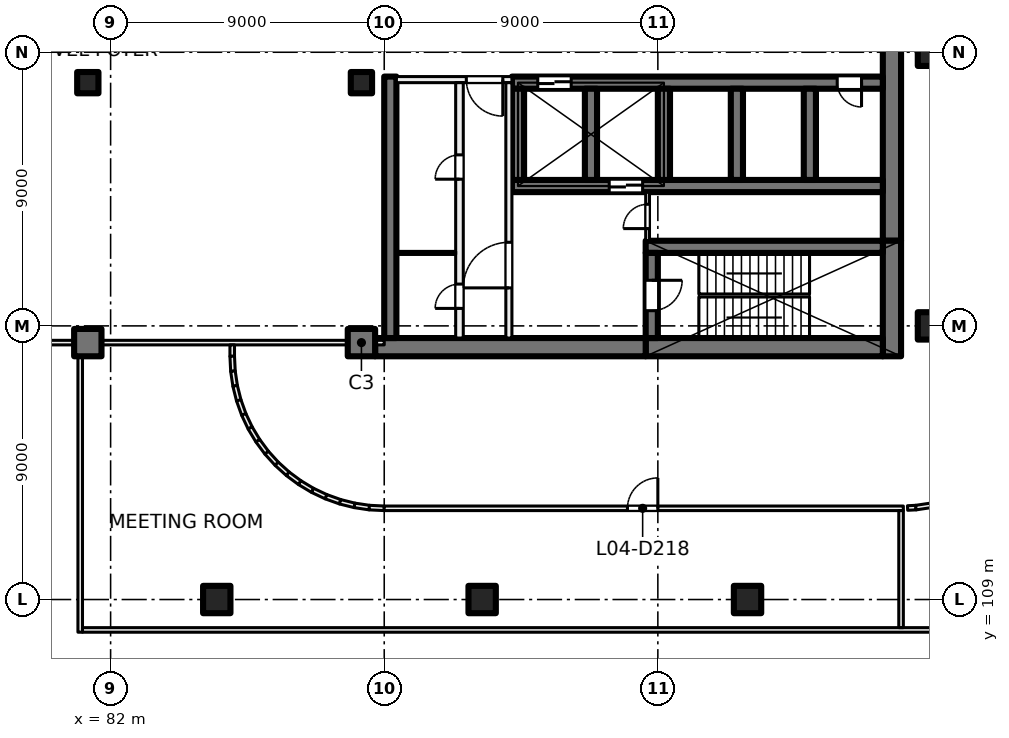
"""IFC4 building model, lengths in metres.
Left out: names, types, materials, properties, quantities, classifications, styles, units other than length and angle.
Written with IfcOpenShell. Run it as: python <this file> out.ifc"""

import sys

from ifc_helpers import new_model, si_unit, direction, frame, frame_2d, origin, origin_2d, place, context, subcontext, project, spatial, rectangle, extrude, element, fill, save


model = new_model("IFC4")
c1 = context("Model", 3, precision=1e-05, world=origin(), true_north=direction((0.0, 1.0)))
c2 = subcontext(c1, "Body", "Model", "MODEL_VIEW")
j1 = project(units=[si_unit("LENGTHUNIT", "METRE"), si_unit("PLANEANGLEUNIT", "RADIAN")], contexts=[c1])
p1 = place(None, origin())
s1 = spatial("IfcSite", under=j1, at=p1, CompositionType="ELEMENT")
p2 = place(p1, origin())
s2 = spatial("IfcBuilding", under=s1, at=p2, CompositionType="ELEMENT")
p3 = place(p2, frame((0.0, 0.0, 22.5)))
s3 = spatial("IfcBuildingStorey", under=s2, at=p3, CompositionType="ELEMENT", Elevation=22.5)
for number, where, z_axis, x_axis in (
    (1, (109.0, 118.0, 0.0), (0.0, 0.0, 1.0), (1.0, 0.0, 0.0)),
    (2, (109.0, 127.0, 0.0), (0.0, 0.0, 1.0), (1.0, 0.0, 0.0)),
    (3, (85.491, 109.0, 0.0), (0.0, 0.0, 1.0), (1.0, 0.0, 0.0)),
    (4, (94.221, 109.0, 0.0), (0.0, 0.0, 1.0), (1.0, 0.0, 0.0)),
    (5, (102.95, 109.0, 0.0), (0.0, 0.0, 1.0), (1.0, 0.0, 0.0)),
):
    element("IfcColumn", number, at=place(p3, frame(where, z_axis=z_axis, x_axis=x_axis)), inside=s3, PredefinedType="COLUMN", context=c2, shape_type="SweptSolid", body=[
        extrude(rectangle(XDim=0.9, YDim=0.9, at=origin_2d()), origin(), (0.0, 0.0, 1.0), 5.0),
    ])
for number, where, z_axis, x_axis in (
    (6, (81.25, 126.0, 0.0), (0.0, 0.0, 1.0), (1.0, 0.0, 0.0)),
    (7, (90.25, 126.0, 0.0), (0.0, 0.0, 1.0), (1.0, 0.0, 0.0)),
):
    element("IfcColumn", number, at=place(p3, frame(where, z_axis=z_axis, x_axis=x_axis)), inside=s3, PredefinedType="COLUMN", context=c2, shape_type="SweptSolid", body=[
        extrude(rectangle(XDim=0.7, YDim=0.7, at=origin_2d()), origin(), (0.0, 0.0, 1.0), 5.0),
    ])
for number, where, z_axis, x_axis in (
    (8, (81.25, 117.45, 0.0), (0.0, 0.0, 1.0), (1.0, 0.0, 0.0)),
    (9, (90.25, 117.45, 0.0), (0.0, 0.0, 1.0), (1.0, 0.0, 0.0)),
):
    element("IfcColumn", number, at=place(p3, frame(where, z_axis=z_axis, x_axis=x_axis)), inside=s3, PredefinedType="COLUMN", context=c2, shape_type="SweptSolid", body=[
        extrude(rectangle(XDim=0.9, YDim=0.9, at=origin_2d()), origin(), (0.0, 0.0, 1.0), 5.0),
    ])
p4 = place(p3, frame((107.7, 135.2, 0.0), z_axis=(0.0, 0.0, 1.0), x_axis=(0.0, -1.0, 0.0)))
e10 = element("IfcWall", 10, at=p4, inside=s3, PredefinedType="SHEAR", context=c2, shape_type="SweptSolid", body=[
    extrude(rectangle(XDim=14.4, YDim=0.6, at=frame_2d((7.2, 0.0))), origin(), (0.0, 0.0, 1.0), 5.0),
])
p5 = place(p3, frame((107.7, 120.8, 0.0), z_axis=(0.0, 0.0, 1.0), x_axis=(0.0, -1.0, 0.0)))
e11 = element("IfcWall", 11, at=p5, inside=s3, PredefinedType="SHEAR", context=c2, shape_type="SweptSolid", body=[
    extrude(rectangle(XDim=3.8, YDim=0.6, at=frame_2d((1.9, 0.0))), origin(), (0.0, 0.0, 1.0), 5.0),
])
p6 = place(p3, frame((107.4, 117.3, 0.0), z_axis=(0.0, 0.0, 1.0), x_axis=(-1.0, 0.0, 0.0)))
e12 = element("IfcWall", 12, at=p6, inside=s3, PredefinedType="SHEAR", context=c2, shape_type="SweptSolid", body=[
    extrude(rectangle(XDim=7.8, YDim=0.6, at=frame_2d((3.9, 0.0))), origin(), (0.0, 0.0, 1.0), 5.0),
])
p7 = place(p3, frame((99.6, 117.3, 0.0), z_axis=(0.0, 0.0, 1.0), x_axis=(-1.0, 0.0, 0.0)))
e13 = element("IfcWall", 13, at=p7, inside=s3, PredefinedType="SHEAR", context=c2, shape_type="SweptSolid", body=[
    extrude(rectangle(XDim=8.9, YDim=0.6, at=frame_2d((4.45, 0.0))), origin(), (0.0, 0.0, 1.0), 5.0),
])
p8 = place(p3, frame((107.4, 120.6, 0.0), z_axis=(0.0, 0.0, 1.0), x_axis=(-1.0, 0.0, 0.0)))
e14 = element("IfcWall", 14, at=p8, inside=s3, PredefinedType="SHEAR", context=c2, shape_type="SweptSolid", body=[
    extrude(rectangle(XDim=7.8, YDim=0.4, at=frame_2d((3.9, 0.0))), origin(), (0.0, 0.0, 1.0), 5.0),
])
p9 = place(p3, frame((99.8, 120.4, 0.0), z_axis=(0.0, 0.0, 1.0), x_axis=(0.0, -1.0, 0.0)))
e15 = element("IfcWall", 15, at=p9, inside=s3, PredefinedType="SHEAR", context=c2, shape_type="SweptSolid", body=[
    extrude(rectangle(XDim=2.8, YDim=0.4, at=frame_2d((1.4, 0.0))), origin(), (0.0, 0.0, 1.0), 5.0),
])
p10 = place(p9, frame((0.9, 0.0, 0.0)))
e16 = element("IfcOpeningElement", 16, at=p10, cuts=e15, PredefinedType="OPENING", context=c2, shape_type="SweptSolid", body=[
    extrude(rectangle(XDim=1.0, YDim=2.1, at=frame_2d((0.5, 1.05))), frame((0.0, 0.21, 0.0), z_axis=(0.0, -1.0, 0.0), x_axis=(1.0, 0.0, 0.0)), (0.0, 0.0, 1.0), 0.42),
])
p11 = place(p3, frame((107.4, 126.0, 0.0), z_axis=(0.0, 0.0, 1.0), x_axis=(-1.0, 0.0, 0.0)))
e17 = element("IfcWall", 17, at=p11, inside=s3, PredefinedType="SHEAR", context=c2, shape_type="SweptSolid", body=[
    extrude(rectangle(XDim=12.2, YDim=0.4, at=frame_2d((6.1, 0.0))), origin(), (0.0, 0.0, 1.0), 5.0),
])
p12 = place(p11, frame((10.25, 0.0, 0.0)))
e18 = element("IfcOpeningElement", 18, at=p12, cuts=e17, PredefinedType="OPENING", context=c2, shape_type="SweptSolid", body=[
    extrude(rectangle(XDim=1.1, YDim=2.1, at=frame_2d((0.55, 1.05))), frame((0.0, 0.21, 0.0), z_axis=(0.0, -1.0, 0.0), x_axis=(1.0, 0.0, 0.0)), (0.0, 0.0, 1.0), 0.42),
])
p13 = place(p11, frame((0.7, 0.0, 0.0)))
e19 = element("IfcOpeningElement", 19, at=p13, cuts=e17, PredefinedType="OPENING", context=c2, shape_type="SweptSolid", body=[
    extrude(rectangle(XDim=0.8, YDim=2.1, at=frame_2d((0.4, 1.05))), frame((0.0, 0.21, 0.0), z_axis=(0.0, -1.0, 0.0), x_axis=(1.0, 0.0, 0.0)), (0.0, 0.0, 1.0), 0.42),
])
p14 = place(p3, frame((107.4, 122.6, 0.0), z_axis=(0.0, 0.0, 1.0), x_axis=(-1.0, 0.0, 0.0)))
e20 = element("IfcWall", 20, at=p14, inside=s3, PredefinedType="SHEAR", context=c2, shape_type="SweptSolid", body=[
    extrude(rectangle(XDim=12.2, YDim=0.4, at=frame_2d((6.1, 0.0))), origin(), (0.0, 0.0, 1.0), 5.0),
])
p15 = place(p14, frame((7.9, 0.0, 0.0)))
e21 = element("IfcOpeningElement", 21, at=p15, cuts=e20, PredefinedType="OPENING", context=c2, shape_type="SweptSolid", body=[
    extrude(rectangle(XDim=1.1, YDim=2.1, at=frame_2d((0.55, 1.05))), frame((0.0, 0.21, 0.0), z_axis=(0.0, -1.0, 0.0), x_axis=(1.0, 0.0, 0.0)), (0.0, 0.0, 1.0), 0.42),
])
for number, where, z_axis, x_axis in (
    (22, (105.0, 125.8, 0.0), (0.0, 0.0, 1.0), (0.0, -1.0, 0.0)),
    (23, (102.6, 125.8, 0.0), (0.0, 0.0, 1.0), (0.0, -1.0, 0.0)),
    (24, (100.2, 125.8, 0.0), (0.0, 0.0, 1.0), (0.0, -1.0, 0.0)),
    (25, (97.8, 125.8, 0.0), (0.0, 0.0, 1.0), (0.0, -1.0, 0.0)),
    (26, (95.4, 125.8, 0.0), (0.0, 0.0, 1.0), (0.0, -1.0, 0.0)),
):
    element("IfcWall", number, at=place(p3, frame(where, z_axis=z_axis, x_axis=x_axis)), inside=s3, PredefinedType="SHEAR", context=c2, shape_type="SweptSolid", body=[
        extrude(rectangle(XDim=3.0, YDim=0.4, at=frame_2d((1.5, 0.0))), origin(), (0.0, 0.0, 1.0), 5.0),
    ])
p16 = place(p3, frame((91.2, 126.2, 0.0), z_axis=(0.0, 0.0, 1.0), x_axis=(0.0, -1.0, 0.0)))
e27 = element("IfcWall", 27, at=p16, inside=s3, PredefinedType="SHEAR", context=c2, shape_type="SweptSolid", body=[
    extrude(rectangle(XDim=8.6, YDim=0.4, at=frame_2d((4.3, 0.0))), origin(), (0.0, 0.0, 1.0), 5.0),
])
p17 = place(p3, frame((95.2, 126.1, 0.0), z_axis=(0.0, 0.0, 1.0), x_axis=(-1.0, 0.0, 0.0)))
e28 = element("IfcWall", 28, at=p17, inside=s3, PredefinedType="PARTITIONING", context=c2, shape_type="SweptSolid", body=[
    extrude(rectangle(XDim=3.8, YDim=0.2, at=frame_2d((1.9, 0.0))), origin(), (0.0, 0.0, 1.0), 4.625),
])
p18 = place(p17, frame((0.3, 0.0, 0.0)))
e29 = element("IfcOpeningElement", 29, at=p18, cuts=e28, PredefinedType="OPENING", context=c2, shape_type="SweptSolid", body=[
    extrude(rectangle(XDim=1.2, YDim=2.1, at=frame_2d((0.6, 1.05))), frame((0.0, 0.11, 0.0), z_axis=(0.0, -1.0, 0.0), x_axis=(1.0, 0.0, 0.0)), (0.0, 0.0, 1.0), 0.22),
])
p19 = place(p3, frame((95.1, 117.6, 0.0), z_axis=(0.0, 0.0, 1.0), x_axis=(0.0, 1.0, 0.0)))
e30 = element("IfcWall", 30, at=p19, inside=s3, PredefinedType="PARTITIONING", context=c2, shape_type="SweptSolid", body=[
    extrude(rectangle(XDim=8.4, YDim=0.2, at=frame_2d((4.2, 0.0))), origin(), (0.0, 0.0, 1.0), 4.625),
])
p20 = place(p19, frame((1.65, 0.0, 0.0)))
e31 = element("IfcOpeningElement", 31, at=p20, cuts=e30, PredefinedType="OPENING", context=c2, shape_type="SweptSolid", body=[
    extrude(rectangle(XDim=1.5, YDim=2.1, at=frame_2d((0.75, 1.05))), frame((0.0, 0.11, 0.0), z_axis=(0.0, -1.0, 0.0), x_axis=(1.0, 0.0, 0.0)), (0.0, 0.0, 1.0), 0.22),
])
p21 = place(p3, frame((93.475, 117.6, 0.0), z_axis=(0.0, 0.0, 1.0), x_axis=(0.0, 1.0, 0.0)))
e32 = element("IfcWall", 32, at=p21, inside=s3, PredefinedType="PARTITIONING", context=c2, shape_type="SweptSolid", body=[
    extrude(rectangle(XDim=8.4, YDim=0.25, at=frame_2d((4.2, 0.0))), origin(), (0.0, 0.0, 1.0), 4.625),
])
p22 = place(p21, frame((5.225, 0.0, 0.0)))
e33 = element("IfcOpeningElement", 33, at=p22, cuts=e32, PredefinedType="OPENING", context=c2, shape_type="SweptSolid", body=[
    extrude(rectangle(XDim=0.8, YDim=2.1, at=frame_2d((0.4, 1.05))), frame((0.0, 0.135, 0.0), z_axis=(0.0, -1.0, 0.0), x_axis=(1.0, 0.0, 0.0)), (0.0, 0.0, 1.0), 0.27),
])
p23 = place(p21, frame((0.975, 0.0, 0.0)))
e34 = element("IfcOpeningElement", 34, at=p23, cuts=e32, PredefinedType="OPENING", context=c2, shape_type="SweptSolid", body=[
    extrude(rectangle(XDim=0.8, YDim=2.1, at=frame_2d((0.4, 1.05))), frame((0.0, 0.135, 0.0), z_axis=(0.0, -1.0, 0.0), x_axis=(1.0, 0.0, 0.0)), (0.0, 0.0, 1.0), 0.27),
])
p24 = place(p3, frame((99.663, 120.8, 0.0), z_axis=(0.0, 0.0, 1.0), x_axis=(0.0, 1.0, 0.0)))
e35 = element("IfcWall", 35, at=p24, inside=s3, PredefinedType="PARTITIONING", context=c2, shape_type="SweptSolid", body=[
    extrude(rectangle(XDim=1.6, YDim=0.125, at=frame_2d((0.8, 0.0))), origin(), (0.0, 0.0, 1.0), 4.625),
])
p25 = place(p24, frame((0.4, 0.0, 0.0)))
e36 = element("IfcOpeningElement", 36, at=p25, cuts=e35, PredefinedType="OPENING", context=c2, shape_type="SweptSolid", body=[
    extrude(rectangle(XDim=0.8, YDim=2.1, at=frame_2d((0.4, 1.05))), frame((0.0, 0.073, 0.0), z_axis=(0.0, -1.0, 0.0), x_axis=(1.0, 0.0, 0.0)), (0.0, 0.0, 1.0), 0.145),
])
p26 = place(p3, frame((93.35, 120.4, 0.0), z_axis=(0.0, 0.0, 1.0), x_axis=(-1.0, 0.0, 0.0)))
e37 = element("IfcWall", 37, at=p26, inside=s3, PredefinedType="PARTITIONING", context=c2, shape_type="SweptSolid", body=[
    extrude(rectangle(XDim=1.95, YDim=0.1, at=frame_2d((0.975, 0.0))), origin(), (0.0, 0.0, 1.0), 4.625),
])
p27 = place(p3, frame((49.825, 117.45, 0.0), z_axis=(0.0, 0.0, 1.0), x_axis=(1.0, 0.0, 0.0)))
e38 = element("IfcWall", 38, at=p27, inside=s3, PredefinedType="PARTITIONING", context=c2, shape_type="SweptSolid", body=[
    extrude(rectangle(XDim=41.175, YDim=0.15, at=frame_2d((20.587, 0.0))), origin(), (0.0, 0.0, 1.0), 4.625),
])
p28 = place(p3, frame((81.0, 107.925, 0.0), z_axis=(0.0, 0.0, 1.0), x_axis=(0.0, 1.0, 0.0)))
e39 = element("IfcWall", 39, at=p28, inside=s3, PredefinedType="PARTITIONING", context=c2, shape_type="SweptSolid", body=[
    extrude(rectangle(XDim=9.45, YDim=0.15, at=frame_2d((4.725, 0.0))), origin(), (0.0, 0.0, 1.0), 4.625),
])
p29 = place(p3, frame((81.075, 108.0, 0.0), z_axis=(0.0, 0.0, 1.0), x_axis=(1.0, 0.0, 0.0)))
e40 = element("IfcWall", 40, at=p29, inside=s3, PredefinedType="PARTITIONING", context=c2, shape_type="SweptSolid", body=[
    extrude(rectangle(XDim=31.545, YDim=0.15, at=frame_2d((15.772, 0.0))), origin(), (0.0, 0.0, 1.0), 4.625),
])
p30 = place(p3, frame((86.0, 116.998, 0.0), z_axis=(0.0, 0.0, 1.0), x_axis=(0.0, 1.0, 0.0)))
e41 = element("IfcWall", 41, at=p30, inside=s3, PredefinedType="PARTITIONING", context=c2, shape_type="SweptSolid", body=[
    extrude(rectangle(XDim=0.377, YDim=0.15, at=frame_2d((0.188, 0.0))), origin(), (0.0, 0.0, 1.0), 4.625),
])
p31 = place(p3, frame((86.0, 117.002, 0.0), z_axis=(0.0, 0.0, 1.0), x_axis=(0.048196018647, -0.998837896651, 0.0)))
e42 = element("IfcWall", 42, at=p31, inside=s3, PredefinedType="PARTITIONING", context=c2, shape_type="SweptSolid", body=[
    extrude(rectangle(XDim=0.496, YDim=0.15, at=frame_2d((0.248, 0.0))), origin(), (0.0, 0.0, 1.0), 4.625),
])
p32 = place(p3, frame((86.023, 116.514, 0.0), z_axis=(0.0, 0.0, 1.0), x_axis=(0.148412307247, -0.988925572052, 0.0)))
e43 = element("IfcWall", 43, at=p32, inside=s3, PredefinedType="PARTITIONING", context=c2, shape_type="SweptSolid", body=[
    extrude(rectangle(XDim=0.499, YDim=0.15, at=frame_2d((0.249, 0.0))), origin(), (0.0, 0.0, 1.0), 4.625),
])
p33 = place(p3, frame((86.095, 116.029, 0.0), z_axis=(0.0, 0.0, 1.0), x_axis=(0.242650732785, -0.970113715952, 0.0)))
e44 = element("IfcWall", 44, at=p33, inside=s3, PredefinedType="PARTITIONING", context=c2, shape_type="SweptSolid", body=[
    extrude(rectangle(XDim=0.499, YDim=0.15, at=frame_2d((0.25, 0.0))), origin(), (0.0, 0.0, 1.0), 4.625),
])
for number, where, z_axis, x_axis in (
    (45, (86.214, 115.553, 0.0), (0.0, 0.0, 1.0), (0.337, -0.941, 0.0)),
    (46, (86.379, 115.09, 0.0), (0.0, 0.0, 1.0), (0.428, -0.904, 0.0)),
):
    element("IfcWall", number, at=place(p3, frame(where, z_axis=z_axis, x_axis=x_axis)), inside=s3, PredefinedType="PARTITIONING", context=c2, shape_type="SweptSolid", body=[
        extrude(rectangle(XDim=0.498, YDim=0.15, at=frame_2d((0.249, 0.0))), origin(), (0.0, 0.0, 1.0), 4.625),
    ])
p34 = place(p3, frame((86.588, 114.646, 0.0), z_axis=(0.0, 0.0, 1.0), x_axis=(0.515791778052, -0.85671397893, 0.0)))
e47 = element("IfcWall", 47, at=p34, inside=s3, PredefinedType="PARTITIONING", context=c2, shape_type="SweptSolid", body=[
    extrude(rectangle(XDim=0.499, YDim=0.15, at=frame_2d((0.249, 0.0))), origin(), (0.0, 0.0, 1.0), 4.625),
])
p35 = place(p3, frame((86.841, 114.225, 0.0), z_axis=(0.0, 0.0, 1.0), x_axis=(0.594570362092, -0.80404358372, 0.0)))
e48 = element("IfcWall", 48, at=p35, inside=s3, PredefinedType="PARTITIONING", context=c2, shape_type="SweptSolid", body=[
    extrude(rectangle(XDim=0.498, YDim=0.15, at=frame_2d((0.249, 0.0))), origin(), (0.0, 0.0, 1.0), 4.625),
])
for number, where, z_axis, x_axis in (
    (49, (87.133, 113.831, 0.0), (0.0, 0.0, 1.0), (0.67, -0.742, 0.0)),
    (50, (87.461, 113.467, 0.0), (0.0, 0.0, 1.0), (0.742, -0.67, 0.0)),
):
    element("IfcWall", number, at=place(p3, frame(where, z_axis=z_axis, x_axis=x_axis)), inside=s3, PredefinedType="PARTITIONING", context=c2, shape_type="SweptSolid", body=[
        extrude(rectangle(XDim=0.499, YDim=0.15, at=frame_2d((0.249, 0.0))), origin(), (0.0, 0.0, 1.0), 4.625),
    ])
p36 = place(p3, frame((87.825, 113.137, 0.0), z_axis=(0.0, 0.0, 1.0), x_axis=(0.80404358372, -0.594570362092, 0.0)))
e51 = element("IfcWall", 51, at=p36, inside=s3, PredefinedType="PARTITIONING", context=c2, shape_type="SweptSolid", body=[
    extrude(rectangle(XDim=0.498, YDim=0.15, at=frame_2d((0.249, 0.0))), origin(), (0.0, 0.0, 1.0), 4.625),
])
p37 = place(p3, frame((88.219, 112.845, 0.0), z_axis=(0.0, 0.0, 1.0), x_axis=(0.85671397893, -0.515791778052, 0.0)))
e52 = element("IfcWall", 52, at=p37, inside=s3, PredefinedType="PARTITIONING", context=c2, shape_type="SweptSolid", body=[
    extrude(rectangle(XDim=0.499, YDim=0.15, at=frame_2d((0.249, 0.0))), origin(), (0.0, 0.0, 1.0), 4.625),
])
for number, where, z_axis, x_axis in (
    (53, (88.64, 112.592, 0.0), (0.0, 0.0, 1.0), (0.904, -0.428, 0.0)),
    (54, (89.084, 112.382, 0.0), (0.0, 0.0, 1.0), (0.941, -0.337, 0.0)),
):
    element("IfcWall", number, at=place(p3, frame(where, z_axis=z_axis, x_axis=x_axis)), inside=s3, PredefinedType="PARTITIONING", context=c2, shape_type="SweptSolid", body=[
        extrude(rectangle(XDim=0.498, YDim=0.15, at=frame_2d((0.249, 0.0))), origin(), (0.0, 0.0, 1.0), 4.625),
    ])
p38 = place(p3, frame((89.545, 112.216, 0.0), z_axis=(0.0, 0.0, 1.0), x_axis=(0.970113715952, -0.242650732785, 0.0)))
e55 = element("IfcWall", 55, at=p38, inside=s3, PredefinedType="PARTITIONING", context=c2, shape_type="SweptSolid", body=[
    extrude(rectangle(XDim=0.499, YDim=0.15, at=frame_2d((0.25, 0.0))), origin(), (0.0, 0.0, 1.0), 4.625),
])
p39 = place(p3, frame((90.021, 112.097, 0.0), z_axis=(0.0, 0.0, 1.0), x_axis=(0.988925572052, -0.148412307247, 0.0)))
e56 = element("IfcWall", 56, at=p39, inside=s3, PredefinedType="PARTITIONING", context=c2, shape_type="SweptSolid", body=[
    extrude(rectangle(XDim=0.499, YDim=0.15, at=frame_2d((0.249, 0.0))), origin(), (0.0, 0.0, 1.0), 4.625),
])
p40 = place(p3, frame((90.506, 112.024, 0.0), z_axis=(0.0, 0.0, 1.0), x_axis=(0.998837896651, -0.048196018647, 0.0)))
e57 = element("IfcWall", 57, at=p40, inside=s3, PredefinedType="PARTITIONING", context=c2, shape_type="SweptSolid", body=[
    extrude(rectangle(XDim=0.496, YDim=0.15, at=frame_2d((0.248, 0.0))), origin(), (0.0, 0.0, 1.0), 4.625),
])
p41 = place(p3, frame((108.075, 112.0, 0.0), z_axis=(0.0, 0.0, 1.0), x_axis=(-1.0, 0.0, 0.0)))
e58 = element("IfcWall", 58, at=p41, inside=s3, PredefinedType="PARTITIONING", context=c2, shape_type="SweptSolid", body=[
    extrude(rectangle(XDim=17.077, YDim=0.15, at=frame_2d((8.539, 0.0))), origin(), (0.0, 0.0, 1.0), 4.625),
])
p42 = place(p41, frame((8.075, 0.0, 0.0)))
e59 = element("IfcOpeningElement", 59, at=p42, cuts=e58, PredefinedType="OPENING", context=c2, shape_type="SweptSolid", body=[
    extrude(rectangle(XDim=1.0, YDim=2.1, at=frame_2d((0.5, 1.05))), frame((0.0, 0.085, 0.0), z_axis=(0.0, -1.0, 0.0), x_axis=(1.0, 0.0, 0.0)), (0.0, 0.0, 1.0), 0.17),
])
p43 = place(p3, frame((108.0, 108.075, 0.0), z_axis=(0.0, 0.0, 1.0), x_axis=(0.0, 1.0, 0.0)))
e60 = element("IfcWall", 60, at=p43, inside=s3, PredefinedType="PARTITIONING", context=c2, shape_type="SweptSolid", body=[
    extrude(rectangle(XDim=3.85, YDim=0.15, at=frame_2d((1.925, 0.0))), origin(), (0.0, 0.0, 1.0), 4.625),
])
p44 = place(p3, frame((108.214, 112.01, 0.0), z_axis=(0.0, 0.0, 1.0), x_axis=(0.99876534507, 0.049676810357, 0.0)))
e61 = element("IfcWall", 61, at=p44, inside=s3, PredefinedType="PARTITIONING", context=c2, shape_type="SweptSolid", body=[
    extrude(rectangle(XDim=0.28, YDim=0.15, at=frame_2d((0.14, 0.0))), origin(), (0.0, 0.0, 1.0), 4.625),
])
p45 = place(p3, frame((108.486, 112.023, 0.0), z_axis=(0.0, 0.0, 1.0), x_axis=(0.988925572052, 0.148412307247, 0.0)))
e62 = element("IfcWall", 62, at=p45, inside=s3, PredefinedType="PARTITIONING", context=c2, shape_type="SweptSolid", body=[
    extrude(rectangle(XDim=0.499, YDim=0.15, at=frame_2d((0.249, 0.0))), origin(), (0.0, 0.0, 1.0), 4.625),
])
p46 = place(p12, origin())
e63 = element("IfcDoor", 63, at=p46, inside=s3, OperationType="DOUBLE_DOOR_SLIDING", PredefinedType="DOOR", context=c2, shape_type="SweptSolid", body=[
    extrude(rectangle(XDim=1.1, YDim=2.1, at=frame_2d((0.55, 1.05))), frame((0.0, 0.025, 0.0), z_axis=(0.0, -1.0, 0.0), x_axis=(1.0, 0.0, 0.0)), (0.0, 0.0, 1.0), 0.05),
])
fill(e18, e63)
p47 = place(p13, origin())
e64 = element("IfcDoor", 64, at=p47, inside=s3, OperationType="SINGLE_SWING_LEFT", PredefinedType="DOOR", context=c2, shape_type="SweptSolid", body=[
    extrude(rectangle(XDim=0.8, YDim=2.1, at=frame_2d((0.4, 1.05))), frame((0.0, 0.025, 0.0), z_axis=(0.0, -1.0, 0.0), x_axis=(1.0, 0.0, 0.0)), (0.0, 0.0, 1.0), 0.05),
])
fill(e19, e64)
p48 = place(p18, origin())
e65 = element("IfcDoor", 65, at=p48, inside=s3, OperationType="DOUBLE_DOOR_SINGLE_SWING", PredefinedType="DOOR", context=c2, shape_type="SweptSolid", body=[
    extrude(rectangle(XDim=1.2, YDim=2.1, at=frame_2d((0.6, 1.05))), frame((0.0, 0.025, 0.0), z_axis=(0.0, -1.0, 0.0), x_axis=(1.0, 0.0, 0.0)), (0.0, 0.0, 1.0), 0.05),
])
fill(e29, e65)
p49 = place(p20, origin())
e66 = element("IfcDoor", 66, at=p49, inside=s3, OperationType="DOUBLE_DOOR_SINGLE_SWING", PredefinedType="DOOR", context=c2, shape_type="SweptSolid", body=[
    extrude(rectangle(XDim=1.5, YDim=2.1, at=frame_2d((0.75, 1.05))), frame((0.0, 0.025, 0.0), z_axis=(0.0, -1.0, 0.0), x_axis=(1.0, 0.0, 0.0)), (0.0, 0.0, 1.0), 0.05),
])
fill(e31, e66)
p50 = place(p10, origin())
e67 = element("IfcDoor", 67, at=p50, inside=s3, OperationType="SINGLE_SWING_LEFT", PredefinedType="DOOR", context=c2, shape_type="SweptSolid", body=[
    extrude(rectangle(XDim=1.0, YDim=2.1, at=frame_2d((0.5, 1.05))), frame((0.0, 0.025, 0.0), z_axis=(0.0, -1.0, 0.0), x_axis=(1.0, 0.0, 0.0)), (0.0, 0.0, 1.0), 0.05),
])
fill(e16, e67)
p51 = place(p25, origin())
e68 = element("IfcDoor", 68, at=p51, inside=s3, OperationType="SINGLE_SWING_RIGHT", PredefinedType="DOOR", context=c2, shape_type="SweptSolid", body=[
    extrude(rectangle(XDim=0.8, YDim=2.1, at=frame_2d((0.4, 1.05))), frame((0.0, 0.025, 0.0), z_axis=(0.0, -1.0, 0.0), x_axis=(1.0, 0.0, 0.0)), (0.0, 0.0, 1.0), 0.05),
])
fill(e36, e68)
p52 = place(p22, origin())
e69 = element("IfcDoor", 69, at=p52, inside=s3, OperationType="SINGLE_SWING_LEFT", PredefinedType="DOOR", context=c2, shape_type="SweptSolid", body=[
    extrude(rectangle(XDim=0.8, YDim=2.1, at=frame_2d((0.4, 1.05))), frame((0.0, 0.025, 0.0), z_axis=(0.0, -1.0, 0.0), x_axis=(1.0, 0.0, 0.0)), (0.0, 0.0, 1.0), 0.05),
])
fill(e33, e69)
p53 = place(p23, origin())
e70 = element("IfcDoor", 70, at=p53, inside=s3, OperationType="SINGLE_SWING_RIGHT", PredefinedType="DOOR", context=c2, shape_type="SweptSolid", body=[
    extrude(rectangle(XDim=0.8, YDim=2.1, at=frame_2d((0.4, 1.05))), frame((0.0, 0.025, 0.0), z_axis=(0.0, -1.0, 0.0), x_axis=(1.0, 0.0, 0.0)), (0.0, 0.0, 1.0), 0.05),
])
fill(e34, e70)
p54 = place(p15, origin())
e71 = element("IfcDoor", 71, at=p54, inside=s3, OperationType="DOUBLE_DOOR_SLIDING", PredefinedType="DOOR", context=c2, shape_type="SweptSolid", body=[
    extrude(rectangle(XDim=1.1, YDim=2.1, at=frame_2d((0.55, 1.05))), frame((0.0, 0.025, 0.0), z_axis=(0.0, -1.0, 0.0), x_axis=(1.0, 0.0, 0.0)), (0.0, 0.0, 1.0), 0.05),
])
fill(e21, e71)
p55 = place(p42, origin())
e72 = element("IfcDoor", 72, at=p55, inside=s3, OperationType="SINGLE_SWING_LEFT", PredefinedType="DOOR", context=c2, shape_type="SweptSolid", body=[
    extrude(rectangle(XDim=1.0, YDim=2.1, at=frame_2d((0.5, 1.05))), frame((0.0, 0.025, 0.0), z_axis=(0.0, -1.0, 0.0), x_axis=(1.0, 0.0, 0.0)), (0.0, 0.0, 1.0), 0.05),
])
fill(e59, e72)
save(model, sys.argv[1])
